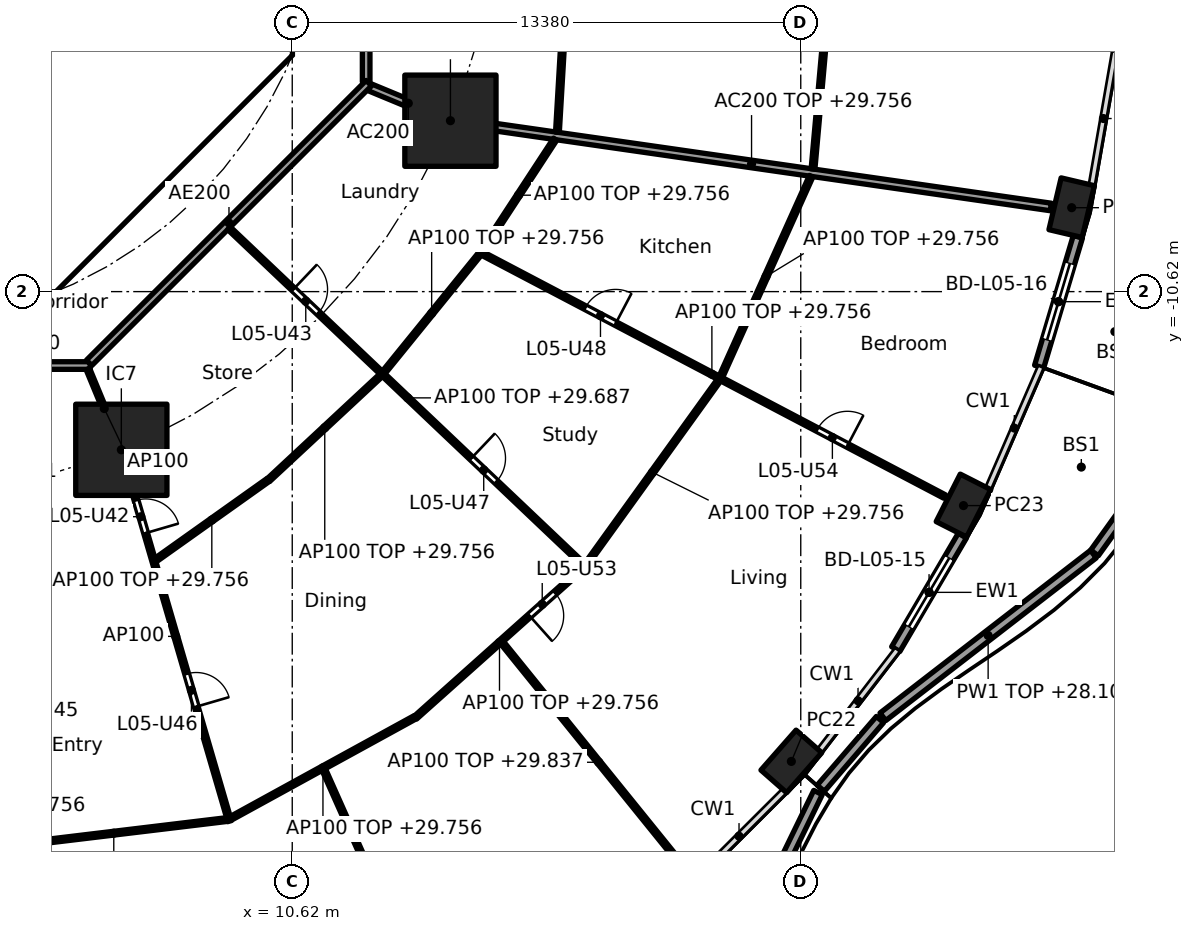
"""IFC4 building model, lengths in metres.
Left out: names, types, materials, properties, quantities, classifications, styles, units other than length and angle.
Written with IfcOpenShell. Run it as: python <this file> out.ifc"""

import sys

from ifc_helpers import new_model, si_unit, direction, frame, frame_2d, origin, origin_2d, place, context, subcontext, project, spatial, polyline, rectangle, hollow_rectangle, outline, extrude, element, fill, save


model = new_model("IFC4")
c1 = context("Model", 3, precision=1e-05, world=origin(), true_north=direction((0.0, 1.0)))
c2 = subcontext(c1, "Body", "Model", "MODEL_VIEW")
j1 = project(units=[si_unit("LENGTHUNIT", "METRE"), si_unit("PLANEANGLEUNIT", "RADIAN")], contexts=[c1])
p1 = place(None, origin())
s1 = spatial("IfcSite", under=j1, at=p1, CompositionType="ELEMENT")
p2 = place(p1, origin())
s2 = spatial("IfcBuilding", under=s1, at=p2, CompositionType="ELEMENT")
p3 = place(p2, frame((0.0, 0.0, 27.0)))
s3 = spatial("IfcBuildingStorey", under=s2, at=p3, CompositionType="ELEMENT", Elevation=27.0)
for number, where, z_axis, x_axis in (
    (1, (23.752, -22.981, 0.0), (0.0, 0.0, 1.0), (0.66, 0.751, 0.0)),
    (2, (28.282, -16.25, 0.0), (0.0, 0.0, 1.0), (0.452, 0.892, 0.0)),
    (3, (31.129, -8.412, 0.0), (0.0, 0.0, 1.0), (0.229, 0.973, 0.0)),
):
    element("IfcColumn", number, at=place(p3, frame(where, z_axis=z_axis, x_axis=x_axis)), inside=s3, PredefinedType="COLUMN", context=c2, shape_type="SweptSolid", body=[
        extrude(hollow_rectangle(XDim=1.4, YDim=0.9, WallThickness=0.05, at=origin_2d()), origin(), (0.0, 0.0, 1.0), 3.7),
    ])
for number, where, z_axis, x_axis in (
    (4, (6.123, -14.782, 0.0), (0.0, 0.0, 1.0), (1.0, 0.0, 0.0)),
    (5, (14.782, -6.123, 0.0), (0.0, 0.0, 1.0), (1.0, 0.0, 0.0)),
):
    element("IfcColumn", number, at=place(p3, frame(where, z_axis=z_axis, x_axis=x_axis)), inside=s3, PredefinedType="COLUMN", context=c2, shape_type="SweptSolid", body=[
        extrude(rectangle(XDim=2.4, YDim=2.4, at=origin_2d()), origin(), (0.0, 0.0, 1.0), 3.7),
    ])
p4 = place(p3, frame((28.252, -17.04, 0.0), z_axis=(0.0, 0.0, 1.0), x_axis=(-0.506311160839, -0.862350861546, 0.0)))
e6 = element("IfcWall", 6, at=p4, inside=s3, PredefinedType="SOLIDWALL", context=c2, shape_type="SweptSolid", body=[
    extrude(rectangle(XDim=3.462, YDim=0.25, at=frame_2d((1.731, 0.0))), origin(), (0.0, 0.0, 1.0), 3.44),
])
p5 = place(p4, frame((0.681, 0.0, 0.0)))
e7 = element("IfcOpeningElement", 7, at=p5, cuts=e6, PredefinedType="OPENING", context=c2, shape_type="SweptSolid", body=[
    extrude(rectangle(XDim=2.1, YDim=2.4, at=frame_2d((1.05, 1.2))), frame((0.0, 0.135, 0.0), z_axis=(0.0, -1.0, 0.0), x_axis=(1.0, 0.0, 0.0)), (0.0, 0.0, 1.0), 0.27),
])
p6 = place(p3, frame((31.292, -9.176, 0.0), z_axis=(0.0, 0.0, 1.0), x_axis=(-0.285871309426, -0.958268018065, 0.0)))
e8 = element("IfcWall", 8, at=p6, inside=s3, PredefinedType="SOLIDWALL", context=c2, shape_type="SweptSolid", body=[
    extrude(rectangle(XDim=3.565, YDim=0.25, at=frame_2d((1.783, 0.0))), origin(), (0.0, 0.0, 1.0), 3.44),
])
p7 = place(p6, frame((0.733, 0.0, 0.0)))
e9 = element("IfcOpeningElement", 9, at=p7, cuts=e8, PredefinedType="OPENING", context=c2, shape_type="SweptSolid", body=[
    extrude(rectangle(XDim=2.1, YDim=2.4, at=frame_2d((1.05, 1.2))), frame((0.0, 0.135, 0.0), z_axis=(0.0, -1.0, 0.0), x_axis=(1.0, 0.0, 0.0)), (0.0, 0.0, 1.0), 0.27),
])
p8 = place(p3, frame((21.907, -29.038, 0.0), z_axis=(0.0, 0.0, 1.0), x_axis=(0.437296277374, 0.899317499994, 0.0)))
e10 = element("IfcWall", 10, at=p8, inside=s3, PredefinedType="PARAPET", context=c2, shape_type="SweptSolid", body=[
    extrude(rectangle(XDim=5.826, YDim=0.25, at=frame_2d((2.913, 0.0))), origin(), (0.0, 0.0, 1.0), 1.1),
])
p9 = place(p3, frame((24.527, -23.688, 0.0), z_axis=(0.0, 0.0, 1.0), x_axis=(0.652642199991, 0.757666258184, 0.0)))
e11 = element("IfcWall", 11, at=p9, inside=s3, PredefinedType="PARAPET", context=c2, shape_type="SweptSolid", body=[
    extrude(rectangle(XDim=2.387, YDim=0.25, at=frame_2d((1.194, 0.0))), origin(), (0.0, 0.0, 1.0), 1.1),
])
p10 = place(p3, frame((26.161, -21.807, 0.0), z_axis=(0.0, 0.0, 1.0), x_axis=(0.791260452579, 0.611479268811, 0.0)))
e12 = element("IfcWall", 12, at=p10, inside=s3, PredefinedType="PARAPET", context=c2, shape_type="SweptSolid", body=[
    extrude(rectangle(XDim=6.999, YDim=0.25, at=frame_2d((3.5, 0.0))), origin(), (0.0, 0.0, 1.0), 1.1),
])
p11 = place(p3, frame((31.729, -17.496, 0.0), z_axis=(0.0, 0.0, 1.0), x_axis=(0.582851512062, 0.812578682274, 0.0)))
e13 = element("IfcWall", 13, at=p11, inside=s3, PredefinedType="PARAPET", context=c2, shape_type="SweptSolid", body=[
    extrude(rectangle(XDim=1.616, YDim=0.25, at=frame_2d((0.808, 0.0))), origin(), (0.0, 0.0, 1.0), 1.1),
])
p12 = place(p3, frame((4.613, -9.988, 0.0), z_axis=(0.0, 0.0, 1.0), x_axis=(0.707106781187, 0.707106781187, 0.0)))
e14 = element("IfcWall", 14, at=p12, inside=s3, PredefinedType="SHEAR", context=c2, shape_type="SweptSolid", body=[
    extrude(rectangle(XDim=7.602, YDim=0.6, at=frame_2d((3.801, 0.0))), origin(), (0.0, 0.0, 1.0), 3.44),
])
p13 = place(p12, frame((3.201, 0.0, 0.0)))
e15 = element("IfcOpeningElement", 15, at=p13, cuts=e14, PredefinedType="OPENING", context=c2, shape_type="SweptSolid", body=[
    extrude(rectangle(XDim=1.2, YDim=2.1, at=frame_2d((0.6, 1.05))), frame((0.0, 0.31, 0.0), z_axis=(0.0, -1.0, 0.0), x_axis=(1.0, 0.0, 0.0)), (0.0, 0.0, 1.0), 0.62),
])
p14 = place(p3, origin())
e16 = element("IfcWall", 16, at=p14, inside=s3, PredefinedType="SHEAR", context=c2, shape_type="SweptSolid", body=[
    extrude(outline(polyline([(-4.152, -10.025), (4.152, -10.025), (4.401, -9.776), (4.825, -10.2), (4.401, -10.625), (-4.401, -10.625), (-4.825, -10.2), (-4.401, -9.776), (-4.152, -10.025)])), origin(), (0.0, 0.0, 1.0), 3.44),
])
p15 = place(p3, origin())
e17 = element("IfcWall", 17, at=p15, inside=s3, PredefinedType="SHEAR", context=c2, shape_type="SweptSolid", body=[
    extrude(outline(polyline([(9.776, -4.401), (10.025, -4.152), (10.025, -3.801), (10.025, 4.152), (9.776, 4.401), (10.2, 4.825), (10.625, 4.401), (10.625, -4.401), (10.2, -4.825), (9.776, -4.401)])), origin(), (0.0, 0.0, 1.0), 3.44),
])
p16 = place(p3, frame((12.657, -5.243, 0.0), z_axis=(0.0, 0.0, 1.0), x_axis=(0.923853160736, -0.382747093259, 0.0)))
e18 = element("IfcWall", 18, at=p16, inside=s3, PredefinedType="PARTITIONING", context=c2, shape_type="SweptSolid", body=[
    extrude(rectangle(XDim=2.2, YDim=0.2, at=frame_2d((1.1, 0.0))), origin(), (0.0, 0.0, 1.0), 3.44),
])
p17 = place(p3, frame((14.832, -6.13, 0.0), z_axis=(0.0, 0.0, 1.0), x_axis=(0.989836541293, -0.142209779978, 0.0)))
e19 = element("IfcWall", 19, at=p17, inside=s3, PredefinedType="PARTITIONING", context=c2, shape_type="SweptSolid", body=[
    extrude(rectangle(XDim=15.909, YDim=0.2, at=frame_2d((7.955, 0.0))), origin(), (0.0, 0.0, 1.0), 2.756),
])
p18 = place(p3, frame((12.565, -5.104, 0.0), z_axis=(0.0, 0.0, 1.0), x_axis=(0.0, 1.0, 0.0)))
e20 = element("IfcWall", 20, at=p18, inside=s3, PredefinedType="PARTITIONING", context=c2, shape_type="SweptSolid", body=[
    extrude(rectangle(XDim=10.209, YDim=0.2, at=frame_2d((5.104, 0.0))), origin(), (0.0, 0.0, 1.0), 3.44),
])
p19 = place(p3, frame((-5.104, -12.565, 0.0), z_axis=(0.0, 0.0, 1.0), x_axis=(1.0, 0.0, 0.0)))
e21 = element("IfcWall", 21, at=p19, inside=s3, PredefinedType="PARTITIONING", context=c2, shape_type="SweptSolid", body=[
    extrude(rectangle(XDim=10.409, YDim=0.2, at=frame_2d((5.205, 0.0))), origin(), (0.0, 0.0, 1.0), 3.44),
])
p20 = place(p19, frame((8.074, 0.0, 0.0)))
e22 = element("IfcOpeningElement", 22, at=p20, cuts=e21, PredefinedType="OPENING", context=c2, shape_type="SweptSolid", body=[
    extrude(rectangle(XDim=1.0, YDim=2.1, at=frame_2d((0.5, 1.05))), frame((0.0, 0.11, 0.0), z_axis=(0.0, -1.0, 0.0), x_axis=(1.0, 0.0, 0.0)), (0.0, 0.0, 1.0), 0.22),
])
p21 = place(p3, frame((5.275, -12.494, 0.0), z_axis=(0.0, 0.0, 1.0), x_axis=(0.707106781187, 0.707106781187, 0.0)))
e23 = element("IfcWall", 23, at=p21, inside=s3, PredefinedType="PARTITIONING", context=c2, shape_type="SweptSolid", body=[
    extrude(rectangle(XDim=10.409, YDim=0.2, at=frame_2d((5.205, 0.0))), origin(), (0.0, 0.0, 1.0), 3.44),
])
p22 = place(p3, frame((17.977, 0.05, 0.0), z_axis=(0.0, 0.0, 1.0), x_axis=(-0.058516864568, -0.998286420103, 0.0)))
e24 = element("IfcWall", 24, at=p22, inside=s3, PredefinedType="PARTITIONING", context=c2, shape_type="SweptSolid", body=[
    extrude(rectangle(XDim=6.488, YDim=0.1, at=frame_2d((3.244, 0.0))), origin(), (0.0, 0.0, 1.0), 2.756),
])
p23 = place(p3, frame((24.982, -0.05, 0.0), z_axis=(0.0, 0.0, 1.0), x_axis=(-0.08944290521, -0.995991951126, 0.0)))
e25 = element("IfcWall", 25, at=p23, inside=s3, PredefinedType="PARTITIONING", context=c2, shape_type="SweptSolid", body=[
    extrude(rectangle(XDim=7.373, YDim=0.1, at=frame_2d((3.686, 0.0))), origin(), (0.0, 0.0, 1.0), 2.756),
])
p24 = place(p23, frame((3.236, 0.0, 0.0)))
e26 = element("IfcOpeningElement", 26, at=p24, cuts=e25, PredefinedType="OPENING", context=c2, shape_type="SweptSolid", body=[
    extrude(rectangle(XDim=0.9, YDim=2.1, at=frame_2d((0.45, 1.05))), frame((0.0, 0.06, 0.0), z_axis=(0.0, -1.0, 0.0), x_axis=(1.0, 0.0, 0.0)), (0.0, 0.0, 1.0), 0.12),
])
p25 = place(p3, frame((2.941, -25.229, 0.0), z_axis=(0.0, 0.0, 1.0), x_axis=(0.992836798252, 0.119478416615, 0.0)))
e27 = element("IfcWall", 27, at=p25, inside=s3, PredefinedType="PARTITIONING", context=c2, shape_type="SweptSolid", body=[
    extrude(rectangle(XDim=6.01, YDim=0.1, at=frame_2d((3.005, 0.0))), origin(), (0.0, 0.0, 1.0), 2.756),
])
p26 = place(p3, frame((5.243, -12.657, 0.0), z_axis=(0.0, 0.0, 1.0), x_axis=(0.382719158442, -0.923864733477, 0.0)))
e28 = element("IfcWall", 28, at=p26, inside=s3, PredefinedType="PARTITIONING", context=c2, shape_type="SweptSolid", body=[
    extrude(rectangle(XDim=2.25, YDim=0.1, at=frame_2d((1.125, 0.0))), origin(), (0.0, 0.0, 1.0), 3.44),
])
p27 = place(p3, frame((6.137, -14.83, 0.0), z_axis=(0.0, 0.0, 1.0), x_axis=(0.279843546189, -0.960045618529, 0.0)))
e29 = element("IfcWall", 29, at=p27, inside=s3, PredefinedType="PARTITIONING", context=c2, shape_type="SweptSolid", body=[
    extrude(rectangle(XDim=10.127, YDim=0.1, at=frame_2d((5.063, 0.0))), origin(), (0.0, 0.0, 1.0), 3.44),
])
p28 = place(p27, frame((1.334, 0.0, 0.0)))
e30 = element("IfcOpeningElement", 30, at=p28, cuts=e29, PredefinedType="OPENING", context=c2, shape_type="SweptSolid", body=[
    extrude(rectangle(XDim=0.9, YDim=2.1, at=frame_2d((0.45, 1.05))), frame((0.0, 0.06, 0.0), z_axis=(0.0, -1.0, 0.0), x_axis=(1.0, 0.0, 0.0)), (0.0, 0.0, 1.0), 0.12),
])
p29 = place(p27, frame((6.091, 0.0, 0.0)))
e31 = element("IfcOpeningElement", 31, at=p29, cuts=e29, PredefinedType="OPENING", context=c2, shape_type="SweptSolid", body=[
    extrude(rectangle(XDim=0.9, YDim=2.1, at=frame_2d((0.45, 1.05))), frame((0.0, 0.06, 0.0), z_axis=(0.0, -1.0, 0.0), x_axis=(1.0, 0.0, 0.0)), (0.0, 0.0, 1.0), 0.12),
])
p30 = place(p3, frame((7.019, -17.686, 0.0), z_axis=(0.0, 0.0, 1.0), x_axis=(0.81494477814, 0.57953861699, 0.0)))
e32 = element("IfcWall", 32, at=p30, inside=s3, PredefinedType="PARTITIONING", context=c2, shape_type="SweptSolid", body=[
    extrude(rectangle(XDim=3.644, YDim=0.1, at=frame_2d((1.822, 0.0))), origin(), (0.0, 0.0, 1.0), 2.756),
])
p31 = place(p3, frame((9.001, -24.48, 0.0), z_axis=(0.0, 0.0, 1.0), x_axis=(0.876794415294, 0.480865421203, 0.0)))
e33 = element("IfcWall", 33, at=p31, inside=s3, PredefinedType="PARTITIONING", context=c2, shape_type="SweptSolid", body=[
    extrude(rectangle(XDim=5.536, YDim=0.1, at=frame_2d((2.768, 0.0))), origin(), (0.0, 0.0, 1.0), 2.756),
])
p32 = place(p3, frame((11.448, -23.195, 0.0), z_axis=(0.0, 0.0, 1.0), x_axis=(0.407016520798, -0.913420796675, 0.0)))
e34 = element("IfcWall", 34, at=p32, inside=s3, PredefinedType="PARTITIONING", context=c2, shape_type="SweptSolid", body=[
    extrude(rectangle(XDim=7.944, YDim=0.1, at=frame_2d((3.972, 0.0))), origin(), (0.0, 0.0, 1.0), 2.837),
])
p33 = place(p32, frame((3.522, 0.0, 0.0)))
e35 = element("IfcOpeningElement", 35, at=p33, cuts=e34, PredefinedType="OPENING", context=c2, shape_type="SweptSolid", body=[
    extrude(rectangle(XDim=0.9, YDim=2.1, at=frame_2d((0.45, 1.05))), frame((0.0, 0.06, 0.0), z_axis=(0.0, -1.0, 0.0), x_axis=(1.0, 0.0, 0.0)), (0.0, 0.0, 1.0), 0.12),
])
p34 = place(p3, frame((9.993, -15.579, 0.0), z_axis=(0.0, 0.0, 1.0), x_axis=(0.732028724098, 0.681273768096, 0.0)))
e36 = element("IfcWall", 36, at=p34, inside=s3, PredefinedType="PARTITIONING", context=c2, shape_type="SweptSolid", body=[
    extrude(rectangle(XDim=4.05, YDim=0.1, at=frame_2d((2.025, 0.0))), origin(), (0.0, 0.0, 1.0), 2.756),
])
p35 = place(p3, frame((13.862, -21.828, 0.0), z_axis=(0.0, 0.0, 1.0), x_axis=(0.745812746724, 0.666155647596, 0.0)))
e37 = element("IfcWall", 37, at=p35, inside=s3, PredefinedType="PARTITIONING", context=c2, shape_type="SweptSolid", body=[
    extrude(rectangle(XDim=5.931, YDim=0.1, at=frame_2d((2.965, 0.0))), origin(), (0.0, 0.0, 1.0), 2.756),
])
p36 = place(p35, frame((4.023, 0.0, 0.0)))
e38 = element("IfcOpeningElement", 38, at=p36, cuts=e37, PredefinedType="OPENING", context=c2, shape_type="SweptSolid", body=[
    extrude(rectangle(XDim=0.9, YDim=2.1, at=frame_2d((0.45, 1.05))), frame((0.0, 0.06, 0.0), z_axis=(0.0, -1.0, 0.0), x_axis=(1.0, 0.0, 0.0)), (0.0, 0.0, 1.0), 0.12),
])
p37 = place(p3, frame((16.142, -19.858, 0.0), z_axis=(0.0, 0.0, 1.0), x_axis=(0.628738066508, -0.777617157555, 0.0)))
e39 = element("IfcWall", 39, at=p37, inside=s3, PredefinedType="PARTITIONING", context=c2, shape_type="SweptSolid", body=[
    extrude(rectangle(XDim=8.091, YDim=0.1, at=frame_2d((4.045, 0.0))), origin(), (0.0, 0.0, 1.0), 2.837),
])
p38 = place(p3, frame((8.957, -8.953, 0.0), z_axis=(0.0, 0.0, 1.0), x_axis=(0.725250022034, -0.688485588476, 0.0)))
e40 = element("IfcWall", 40, at=p38, inside=s3, PredefinedType="PARTITIONING", context=c2, shape_type="SweptSolid", body=[
    extrude(rectangle(XDim=12.963, YDim=0.1, at=frame_2d((6.481, 0.0))), origin(), (0.0, 0.0, 1.0), 2.687),
])
p39 = place(p38, frame((2.333, 0.0, 0.0)))
e41 = element("IfcOpeningElement", 41, at=p39, cuts=e40, PredefinedType="OPENING", context=c2, shape_type="SweptSolid", body=[
    extrude(rectangle(XDim=0.9, YDim=2.1, at=frame_2d((0.45, 1.05))), frame((0.0, 0.06, 0.0), z_axis=(0.0, -1.0, 0.0), x_axis=(1.0, 0.0, 0.0)), (0.0, 0.0, 1.0), 0.12),
])
p40 = place(p38, frame((8.79, 0.0, 0.0)))
e42 = element("IfcOpeningElement", 42, at=p40, cuts=e40, PredefinedType="OPENING", context=c2, shape_type="SweptSolid", body=[
    extrude(rectangle(XDim=0.9, YDim=2.1, at=frame_2d((0.45, 1.05))), frame((0.0, 0.06, 0.0), z_axis=(0.0, -1.0, 0.0), x_axis=(1.0, 0.0, 0.0)), (0.0, 0.0, 1.0), 0.12),
])
p41 = place(p3, frame((13.026, -12.747, 0.0), z_axis=(0.0, 0.0, 1.0), x_axis=(0.630126826288, 0.776492229705, 0.0)))
e43 = element("IfcWall", 43, at=p41, inside=s3, PredefinedType="PARTITIONING", context=c2, shape_type="SweptSolid", body=[
    extrude(rectangle(XDim=4.007, YDim=0.1, at=frame_2d((2.003, 0.0))), origin(), (0.0, 0.0, 1.0), 2.756),
])
p42 = place(p3, frame((18.351, -17.803, 0.0), z_axis=(0.0, 0.0, 1.0), x_axis=(0.584563700282, 0.811347817099, 0.0)))
e44 = element("IfcWall", 44, at=p42, inside=s3, PredefinedType="PARTITIONING", context=c2, shape_type="SweptSolid", body=[
    extrude(rectangle(XDim=5.984, YDim=0.1, at=frame_2d((2.992, 0.0))), origin(), (0.0, 0.0, 1.0), 2.756),
])
p43 = place(p3, frame((15.538, -9.574, 0.0), z_axis=(0.0, 0.0, 1.0), x_axis=(0.885181406501, -0.465246039838, 0.0)))
e45 = element("IfcWall", 45, at=p43, inside=s3, PredefinedType="PARTITIONING", context=c2, shape_type="SweptSolid", body=[
    extrude(rectangle(XDim=13.837, YDim=0.1, at=frame_2d((6.918, 0.0))), origin(), (0.0, 0.0, 1.0), 2.756),
])
p44 = place(p43, frame((3.156, 0.0, 0.0)))
e46 = element("IfcOpeningElement", 46, at=p44, cuts=e45, PredefinedType="OPENING", context=c2, shape_type="SweptSolid", body=[
    extrude(rectangle(XDim=0.9, YDim=2.1, at=frame_2d((0.45, 1.05))), frame((0.0, 0.06, 0.0), z_axis=(0.0, -1.0, 0.0), x_axis=(1.0, 0.0, 0.0)), (0.0, 0.0, 1.0), 0.12),
])
p45 = place(p43, frame((10.05, 0.0, 0.0)))
e47 = element("IfcOpeningElement", 47, at=p45, cuts=e45, PredefinedType="OPENING", context=c2, shape_type="SweptSolid", body=[
    extrude(rectangle(XDim=0.9, YDim=2.1, at=frame_2d((0.45, 1.05))), frame((0.0, 0.06, 0.0), z_axis=(0.0, -1.0, 0.0), x_axis=(1.0, 0.0, 0.0)), (0.0, 0.0, 1.0), 0.12),
])
p46 = place(p3, frame((15.609, -9.556, 0.0), z_axis=(0.0, 0.0, 1.0), x_axis=(0.547637987196, 0.836715384692, 0.0)))
e48 = element("IfcWall", 48, at=p46, inside=s3, PredefinedType="PARTITIONING", context=c2, shape_type="SweptSolid", body=[
    extrude(rectangle(XDim=3.52, YDim=0.1, at=frame_2d((1.76, 0.0))), origin(), (0.0, 0.0, 1.0), 2.756),
])
p47 = place(p3, frame((21.899, -12.861, 0.0), z_axis=(0.0, 0.0, 1.0), x_axis=(0.410201529109, 0.911994904326, 0.0)))
e49 = element("IfcWall", 49, at=p47, inside=s3, PredefinedType="PARTITIONING", context=c2, shape_type="SweptSolid", body=[
    extrude(rectangle(XDim=5.787, YDim=0.1, at=frame_2d((2.894, 0.0))), origin(), (0.0, 0.0, 1.0), 2.756),
])
p48 = place(p5, origin())
e50 = element("IfcDoor", 50, at=p48, inside=s3, OperationType="SLIDING_TO_LEFT", PredefinedType="DOOR", context=c2, shape_type="SweptSolid", body=[
    extrude(rectangle(XDim=2.1, YDim=2.4, at=frame_2d((1.05, 1.2))), frame((0.0, 0.025, 0.0), z_axis=(0.0, -1.0, 0.0), x_axis=(1.0, 0.0, 0.0)), (0.0, 0.0, 1.0), 0.05),
])
fill(e7, e50)
p49 = place(p7, origin())
e51 = element("IfcDoor", 51, at=p49, inside=s3, OperationType="SLIDING_TO_LEFT", PredefinedType="DOOR", context=c2, shape_type="SweptSolid", body=[
    extrude(rectangle(XDim=2.1, YDim=2.4, at=frame_2d((1.05, 1.2))), frame((0.0, 0.025, 0.0), z_axis=(0.0, -1.0, 0.0), x_axis=(1.0, 0.0, 0.0)), (0.0, 0.0, 1.0), 0.05),
])
fill(e9, e51)
p50 = place(p3, frame((0.0, 0.0, -0.25)))
p51 = place(p50, frame((32.826, -24.282, 0.0), z_axis=(0.0, 0.0, 1.0), x_axis=(0.559077142538, 0.829115642532, 0.0)))
p52 = place(p51, frame((0.0, 0.0, 0.2)))
e52 = element("IfcWindow", 52, at=p52, inside=s3, PartitioningType="SINGLE_PANEL", PredefinedType="SKYLIGHT", context=c2, shape_type="SweptSolid", body=[
    extrude(rectangle(XDim=4.0, YDim=2.0, at=origin_2d()), origin(), (0.0, 0.0, 1.0), 1.25),
])
p53 = place(p13, origin())
e53 = element("IfcDoor", 53, at=p53, inside=s3, OperationType="SINGLE_SWING_LEFT", PredefinedType="DOOR", context=c2, shape_type="SweptSolid", body=[
    extrude(rectangle(XDim=1.2, YDim=2.1, at=frame_2d((0.6, 1.05))), frame((0.0, 0.025, 0.0), z_axis=(0.0, -1.0, 0.0), x_axis=(1.0, 0.0, 0.0)), (0.0, 0.0, 1.0), 0.05),
])
fill(e15, e53)
p54 = place(p28, origin())
e54 = element("IfcDoor", 54, at=p54, inside=s3, OperationType="SINGLE_SWING_RIGHT", PredefinedType="DOOR", context=c2, shape_type="SweptSolid", body=[
    extrude(rectangle(XDim=0.9, YDim=2.1, at=frame_2d((0.45, 1.05))), frame((0.0, 0.025, 0.0), z_axis=(0.0, -1.0, 0.0), x_axis=(1.0, 0.0, 0.0)), (0.0, 0.0, 1.0), 0.05),
])
fill(e30, e54)
p55 = place(p39, origin())
e55 = element("IfcDoor", 55, at=p55, inside=s3, OperationType="SINGLE_SWING_LEFT", PredefinedType="DOOR", context=c2, shape_type="SweptSolid", body=[
    extrude(rectangle(XDim=0.9, YDim=2.1, at=frame_2d((0.45, 1.05))), frame((0.0, 0.025, 0.0), z_axis=(0.0, -1.0, 0.0), x_axis=(1.0, 0.0, 0.0)), (0.0, 0.0, 1.0), 0.05),
])
fill(e41, e55)
p56 = place(p29, origin())
e56 = element("IfcDoor", 56, at=p56, inside=s3, OperationType="SINGLE_SWING_RIGHT", PredefinedType="DOOR", context=c2, shape_type="SweptSolid", body=[
    extrude(rectangle(XDim=0.9, YDim=2.1, at=frame_2d((0.45, 1.05))), frame((0.0, 0.025, 0.0), z_axis=(0.0, -1.0, 0.0), x_axis=(1.0, 0.0, 0.0)), (0.0, 0.0, 1.0), 0.05),
])
fill(e31, e56)
p57 = place(p40, origin())
e57 = element("IfcDoor", 57, at=p57, inside=s3, OperationType="SINGLE_SWING_LEFT", PredefinedType="DOOR", context=c2, shape_type="SweptSolid", body=[
    extrude(rectangle(XDim=0.9, YDim=2.1, at=frame_2d((0.45, 1.05))), frame((0.0, 0.025, 0.0), z_axis=(0.0, -1.0, 0.0), x_axis=(1.0, 0.0, 0.0)), (0.0, 0.0, 1.0), 0.05),
])
fill(e42, e57)
p58 = place(p44, origin())
e58 = element("IfcDoor", 58, at=p58, inside=s3, OperationType="SINGLE_SWING_RIGHT", PredefinedType="DOOR", context=c2, shape_type="SweptSolid", body=[
    extrude(rectangle(XDim=0.9, YDim=2.1, at=frame_2d((0.45, 1.05))), frame((0.0, 0.025, 0.0), z_axis=(0.0, -1.0, 0.0), x_axis=(1.0, 0.0, 0.0)), (0.0, 0.0, 1.0), 0.05),
])
fill(e46, e58)
p59 = place(p36, frame((0.9, 0.0, 0.0), x_axis=(-1.0, 0.0, 0.0)))
e59 = element("IfcDoor", 59, at=p59, inside=s3, OperationType="SINGLE_SWING_RIGHT", PredefinedType="DOOR", context=c2, shape_type="SweptSolid", body=[
    extrude(rectangle(XDim=0.9, YDim=2.1, at=frame_2d((0.45, 1.05))), frame((0.0, 0.025, 0.0), z_axis=(0.0, -1.0, 0.0), x_axis=(1.0, 0.0, 0.0)), (0.0, 0.0, 1.0), 0.05),
])
fill(e38, e59)
p60 = place(p45, origin())
e60 = element("IfcDoor", 60, at=p60, inside=s3, OperationType="SINGLE_SWING_RIGHT", PredefinedType="DOOR", context=c2, shape_type="SweptSolid", body=[
    extrude(rectangle(XDim=0.9, YDim=2.1, at=frame_2d((0.45, 1.05))), frame((0.0, 0.025, 0.0), z_axis=(0.0, -1.0, 0.0), x_axis=(1.0, 0.0, 0.0)), (0.0, 0.0, 1.0), 0.05),
])
fill(e47, e60)
save(model, sys.argv[1])
